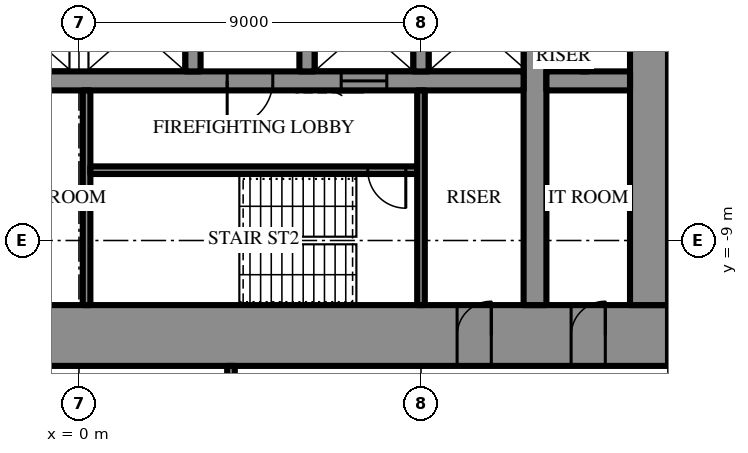
"""IFC4 building model, lengths in metres.
Left out: names, types, materials, properties, quantities, classifications, styles, units other than length and angle.
Written with IfcOpenShell. Run it as: python <this file> out.ifc"""

import sys

from ifc_helpers import new_model, si_unit, direction, frame, frame_2d, origin, place, context, subcontext, project, spatial, rectangle, extrude, element, fill, save


model = new_model("IFC4")
c1 = context("Model", 3, precision=1e-05, world=origin(), true_north=direction((0.0, 1.0)))
c2 = subcontext(c1, "Body", "Model", "MODEL_VIEW")
j1 = project(units=[si_unit("LENGTHUNIT", "METRE"), si_unit("PLANEANGLEUNIT", "RADIAN")], contexts=[c1])
p1 = place(None, origin())
s1 = spatial("IfcSite", under=j1, at=p1, CompositionType="ELEMENT")
p2 = place(p1, origin())
s2 = spatial("IfcBuilding", under=s1, at=p2, CompositionType="ELEMENT")
p3 = place(p2, frame((0.0, 0.0, 219.7)))
s3 = spatial("IfcBuildingStorey", under=s2, at=p3, CompositionType="ELEMENT", Elevation=219.7)
p4 = place(p3, frame((15.5, -11.5, 0.0), z_axis=(0.0, 0.0, 1.0), x_axis=(-1.0, 0.0, 0.0)))
e1 = element("IfcWall", 1, at=p4, inside=s3, PredefinedType="SHEAR", context=c2, shape_type="SweptSolid", body=[
    extrude(rectangle(XDim=31.0, YDim=1.6, at=frame_2d((15.5, 0.0))), origin(), (0.0, 0.0, 1.0), 4.2),
])
p5 = place(p4, frame((16.35, 0.0, 0.0)))
e2 = element("IfcOpeningElement", 2, at=p5, cuts=e1, PredefinedType="OPENING", context=c2, shape_type="SweptSolid", body=[
    extrude(rectangle(XDim=0.9, YDim=2.2, at=frame_2d((0.45, 1.1))), frame((0.0, 0.81, 0.0), z_axis=(0.0, -1.0, 0.0), x_axis=(1.0, 0.0, 0.0)), (0.0, 0.0, 1.0), 1.62),
])
p6 = place(p4, frame((19.35, 0.0, 0.0)))
e3 = element("IfcOpeningElement", 3, at=p6, cuts=e1, PredefinedType="OPENING", context=c2, shape_type="SweptSolid", body=[
    extrude(rectangle(XDim=0.9, YDim=2.2, at=frame_2d((0.45, 1.1))), frame((0.0, 0.81, 0.0), z_axis=(0.0, -1.0, 0.0), x_axis=(1.0, 0.0, 0.0)), (0.0, 0.0, 1.0), 1.62),
])
p7 = place(p4, frame((22.4, 0.0, 0.0)))
e4 = element("IfcOpeningElement", 4, at=p7, cuts=e1, PredefinedType="OPENING", context=c2, shape_type="SweptSolid", body=[
    extrude(rectangle(XDim=1.0, YDim=2.2, at=frame_2d((0.5, 1.1))), frame((0.0, 0.81, 0.0), z_axis=(0.0, -1.0, 0.0), x_axis=(1.0, 0.0, 0.0)), (0.0, 0.0, 1.0), 1.62),
])
p8 = place(p4, frame((1.65, 0.0, 0.0)))
e5 = element("IfcOpeningElement", 5, at=p8, cuts=e1, PredefinedType="OPENING", context=c2, shape_type="SweptSolid", body=[
    extrude(rectangle(XDim=0.9, YDim=2.2, at=frame_2d((0.45, 1.1))), frame((0.0, 0.81, 0.0), z_axis=(0.0, -1.0, 0.0), x_axis=(1.0, 0.0, 0.0)), (0.0, 0.0, 1.0), 1.62),
])
p9 = place(p4, frame((4.65, 0.0, 0.0)))
e6 = element("IfcOpeningElement", 6, at=p9, cuts=e1, PredefinedType="OPENING", context=c2, shape_type="SweptSolid", body=[
    extrude(rectangle(XDim=0.9, YDim=2.2, at=frame_2d((0.45, 1.1))), frame((0.0, 0.81, 0.0), z_axis=(0.0, -1.0, 0.0), x_axis=(1.0, 0.0, 0.0)), (0.0, 0.0, 1.0), 1.62),
])
p10 = place(p4, frame((25.45, 0.0, 0.0)))
e7 = element("IfcOpeningElement", 7, at=p10, cuts=e1, PredefinedType="OPENING", context=c2, shape_type="SweptSolid", body=[
    extrude(rectangle(XDim=0.9, YDim=2.2, at=frame_2d((0.45, 1.1))), frame((0.0, 0.81, 0.0), z_axis=(0.0, -1.0, 0.0), x_axis=(1.0, 0.0, 0.0)), (0.0, 0.0, 1.0), 1.62),
])
p11 = place(p4, frame((28.45, 0.0, 0.0)))
e8 = element("IfcOpeningElement", 8, at=p11, cuts=e1, PredefinedType="OPENING", context=c2, shape_type="SweptSolid", body=[
    extrude(rectangle(XDim=0.9, YDim=2.2, at=frame_2d((0.45, 1.1))), frame((0.0, 0.81, 0.0), z_axis=(0.0, -1.0, 0.0), x_axis=(1.0, 0.0, 0.0)), (0.0, 0.0, 1.0), 1.62),
])
p12 = place(p3, frame((15.0, -10.7, 0.0), z_axis=(0.0, 0.0, 1.0), x_axis=(0.0, 1.0, 0.0)))
e9 = element("IfcWall", 9, at=p12, inside=s3, PredefinedType="SHEAR", context=c2, shape_type="SweptSolid", body=[
    extrude(rectangle(XDim=21.4, YDim=1.0, at=frame_2d((10.7, 0.0))), origin(), (0.0, 0.0, 1.0), 4.2),
])
p13 = place(p12, frame((9.8, 0.0, 0.0)))
e10 = element("IfcOpeningElement", 10, at=p13, cuts=e9, PredefinedType="OPENING", context=c2, shape_type="SweptSolid", body=[
    extrude(rectangle(XDim=1.8, YDim=2.4, at=frame_2d((0.9, 1.2))), frame((0.0, 0.51, 0.0), z_axis=(0.0, -1.0, 0.0), x_axis=(1.0, 0.0, 0.0)), (0.0, 0.0, 1.0), 1.02),
])
p14 = place(p3, frame((12.0, -10.7, 0.0), z_axis=(0.0, 0.0, 1.0), x_axis=(0.0, 1.0, 0.0)))
e11 = element("IfcWall", 11, at=p14, inside=s3, PredefinedType="SHEAR", context=c2, shape_type="SweptSolid", body=[
    extrude(rectangle(XDim=21.4, YDim=0.6, at=frame_2d((10.7, 0.0))), origin(), (0.0, 0.0, 1.0), 4.2),
])
p15 = place(p14, frame((9.8, 0.0, 0.0)))
e12 = element("IfcOpeningElement", 12, at=p15, cuts=e11, PredefinedType="OPENING", context=c2, shape_type="SweptSolid", body=[
    extrude(rectangle(XDim=1.8, YDim=2.4, at=frame_2d((0.9, 1.2))), frame((0.0, 0.31, 0.0), z_axis=(0.0, -1.0, 0.0), x_axis=(1.0, 0.0, 0.0)), (0.0, 0.0, 1.0), 0.62),
])
p16 = place(p3, frame((14.5, -4.8, 0.0), z_axis=(0.0, 0.0, 1.0), x_axis=(-1.0, 0.0, 0.0)))
e13 = element("IfcWall", 13, at=p16, inside=s3, PredefinedType="SHEAR", context=c2, shape_type="SweptSolid", body=[
    extrude(rectangle(XDim=2.2, YDim=0.5, at=frame_2d((1.1, 0.0))), origin(), (0.0, 0.0, 1.0), 4.2),
])
p17 = place(p3, frame((11.7, -4.8, 0.0), z_axis=(0.0, 0.0, 1.0), x_axis=(-1.0, 0.0, 0.0)))
e14 = element("IfcWall", 14, at=p17, inside=s3, PredefinedType="SHEAR", context=c2, shape_type="SweptSolid", body=[
    extrude(rectangle(XDim=23.4, YDim=0.5, at=frame_2d((11.7, 0.0))), origin(), (0.0, 0.0, 1.0), 4.2),
])
p18 = place(p17, frame((6.6, 0.0, 0.0)))
e15 = element("IfcOpeningElement", 15, at=p18, cuts=e14, PredefinedType="OPENING", context=c2, shape_type="SweptSolid", body=[
    extrude(rectangle(XDim=1.2, YDim=2.2, at=frame_2d((0.6, 1.1))), frame((0.0, 0.26, 0.0), z_axis=(0.0, -1.0, 0.0), x_axis=(1.0, 0.0, 0.0)), (0.0, 0.0, 1.0), 0.52),
])
p19 = place(p17, frame((3.6, 0.0, 0.0)))
e16 = element("IfcOpeningElement", 16, at=p19, cuts=e14, PredefinedType="OPENING", context=c2, shape_type="SweptSolid", body=[
    extrude(rectangle(XDim=1.2, YDim=2.2, at=frame_2d((0.6, 1.1))), frame((0.0, 0.26, 0.0), z_axis=(0.0, -1.0, 0.0), x_axis=(1.0, 0.0, 0.0)), (0.0, 0.0, 1.0), 0.52),
])
for number, where, z_axis, x_axis in (
    (17, (9.0, -2.25, 0.0), (0.0, 0.0, 1.0), (0.0, -1.0, 0.0)),
    (18, (6.0, -2.25, 0.0), (0.0, 0.0, 1.0), (0.0, -1.0, 0.0)),
    (19, (3.0, -2.25, 0.0), (0.0, 0.0, 1.0), (0.0, -1.0, 0.0)),
):
    element("IfcWall", number, at=place(p3, frame(where, z_axis=z_axis, x_axis=x_axis)), inside=s3, PredefinedType="SHEAR", context=c2, shape_type="SweptSolid", body=[
        extrude(rectangle(XDim=2.3, YDim=0.4, at=frame_2d((1.15, 0.0))), origin(), (0.0, 0.0, 1.0), 4.2),
    ])
p20 = place(p3, frame((0.2, -5.05, 0.0), z_axis=(0.0, 0.0, 1.0), x_axis=(0.0, -1.0, 0.0)))
e20 = element("IfcWall", 20, at=p20, inside=s3, PredefinedType="SHEAR", context=c2, shape_type="SweptSolid", body=[
    extrude(rectangle(XDim=5.65, YDim=0.2, at=frame_2d((2.825, 0.0))), origin(), (0.0, 0.0, 1.0), 4.2),
])
p21 = place(p3, frame((8.9, -7.15, 0.0), z_axis=(0.0, 0.0, 1.0), x_axis=(-1.0, 0.0, 0.0)))
e21 = element("IfcWall", 21, at=p21, inside=s3, PredefinedType="SHEAR", context=c2, shape_type="SweptSolid", body=[
    extrude(rectangle(XDim=8.6, YDim=0.2, at=frame_2d((4.3, 0.0))), origin(), (0.0, 0.0, 1.0), 4.2),
])
p22 = place(p21, frame((0.3, 0.0, 0.0)))
e22 = element("IfcOpeningElement", 22, at=p22, cuts=e21, PredefinedType="OPENING", context=c2, shape_type="SweptSolid", body=[
    extrude(rectangle(XDim=1.0, YDim=2.2, at=frame_2d((0.5, 1.1))), frame((0.0, 0.11, 0.0), z_axis=(0.0, -1.0, 0.0), x_axis=(1.0, 0.0, 0.0)), (0.0, 0.0, 1.0), 0.22),
])
p23 = place(p3, frame((9.0, -5.05, 0.0), z_axis=(0.0, 0.0, 1.0), x_axis=(0.0, -1.0, 0.0)))
e23 = element("IfcWall", 23, at=p23, inside=s3, PredefinedType="PARTITIONING", context=c2, shape_type="SweptSolid", body=[
    extrude(rectangle(XDim=5.65, YDim=0.2, at=frame_2d((2.825, 0.0))), origin(), (0.0, 0.0, 1.0), 4.0),
])
p24 = place(p3, frame((13.3, -3.55, 0.0), z_axis=(0.0, 0.0, 1.0), x_axis=(0.0, -1.0, 0.0)))
e24 = element("IfcWall", 24, at=p24, inside=s3, PredefinedType="PARTITIONING", context=c2, shape_type="SweptSolid", body=[
    extrude(rectangle(XDim=1.0, YDim=0.2, at=frame_2d((0.5, 0.0))), origin(), (0.0, 0.0, 1.0), 4.0),
])
p25 = place(p3, frame((4.0, -12.3, 0.0), z_axis=(0.0, 0.0, 1.0), x_axis=(0.0, -1.0, 0.0)))
e25 = element("IfcWall", 25, at=p25, inside=s3, PredefinedType="PARTITIONING", context=c2, shape_type="SweptSolid", body=[
    extrude(rectangle(XDim=15.35, YDim=0.2, at=frame_2d((7.675, 0.0))), origin(), (0.0, 0.0, 1.0), 4.0),
])
p26 = place(p18, origin())
e26 = element("IfcDoor", 26, at=p26, inside=s3, OperationType="SINGLE_SWING_LEFT", PredefinedType="DOOR", context=c2, shape_type="SweptSolid", body=[
    extrude(rectangle(XDim=1.2, YDim=2.2, at=frame_2d((0.6, 1.1))), frame((0.0, 0.025, 0.0), z_axis=(0.0, -1.0, 0.0), x_axis=(1.0, 0.0, 0.0)), (0.0, 0.0, 1.0), 0.05),
])
fill(e15, e26)
p27 = place(p22, origin())
e27 = element("IfcDoor", 27, at=p27, inside=s3, OperationType="SINGLE_SWING_RIGHT", PredefinedType="DOOR", context=c2, shape_type="SweptSolid", body=[
    extrude(rectangle(XDim=1.0, YDim=2.2, at=frame_2d((0.5, 1.1))), frame((0.0, 0.025, 0.0), z_axis=(0.0, -1.0, 0.0), x_axis=(1.0, 0.0, 0.0)), (0.0, 0.0, 1.0), 0.05),
])
fill(e22, e27)
p28 = place(p8, frame((0.9, 0.0, 0.0), z_axis=(0.0, 0.0, 1.0), x_axis=(-1.0, 0.0, 0.0)))
e28 = element("IfcDoor", 28, at=p28, inside=s3, OperationType="SINGLE_SWING_LEFT", PredefinedType="DOOR", context=c2, shape_type="SweptSolid", body=[
    extrude(rectangle(XDim=0.9, YDim=2.2, at=frame_2d((0.45, 1.1))), frame((0.0, 0.025, 0.0), z_axis=(0.0, -1.0, 0.0), x_axis=(1.0, 0.0, 0.0)), (0.0, 0.0, 1.0), 0.05),
])
fill(e5, e28)
p29 = place(p9, frame((0.9, 0.0, 0.0), z_axis=(0.0, 0.0, 1.0), x_axis=(-1.0, 0.0, 0.0)))
e29 = element("IfcDoor", 29, at=p29, inside=s3, OperationType="SINGLE_SWING_LEFT", PredefinedType="DOOR", context=c2, shape_type="SweptSolid", body=[
    extrude(rectangle(XDim=0.9, YDim=2.2, at=frame_2d((0.45, 1.1))), frame((0.0, 0.025, 0.0), z_axis=(0.0, -1.0, 0.0), x_axis=(1.0, 0.0, 0.0)), (0.0, 0.0, 1.0), 0.05),
])
fill(e6, e29)
p30 = place(p19, origin())
e30 = element("IfcDoor", 30, at=p30, inside=s3, OperationType="SLIDING_TO_LEFT", PredefinedType="DOOR", context=c2, shape_type="SweptSolid", body=[
    extrude(rectangle(XDim=1.2, YDim=2.2, at=frame_2d((0.6, 1.1))), frame((0.0, 0.025, 0.0), z_axis=(0.0, -1.0, 0.0), x_axis=(1.0, 0.0, 0.0)), (0.0, 0.0, 1.0), 0.05),
])
fill(e16, e30)
save(model, sys.argv[1])
